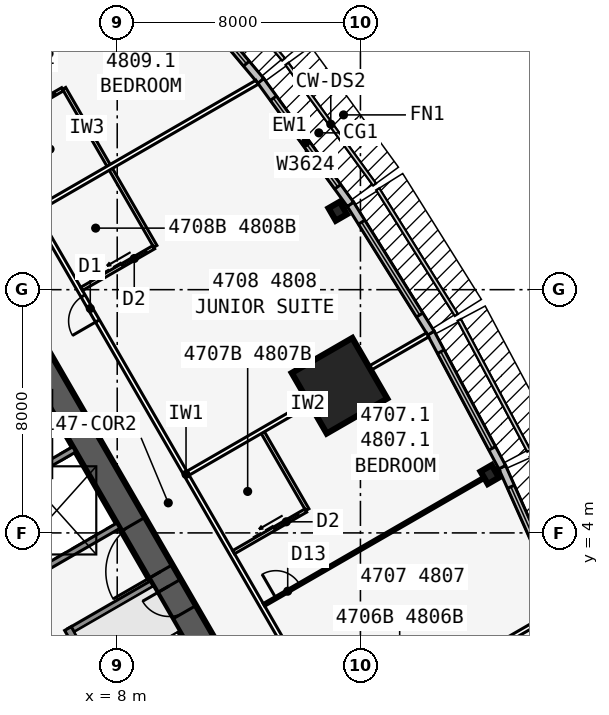
"""IFC4 building model, lengths in metres.
Left out: names, types, materials, properties, quantities, classifications, styles, units other than length and angle.
Written with IfcOpenShell. Run it as: python <this file> out.ifc"""

import sys

from ifc_helpers import new_model, si_unit, direction, frame, frame_2d, origin, origin_2d, place, context, subcontext, project, spatial, rectangle, i_section, extrude, element, fill, save


model = new_model("IFC4")
c1 = context("Model", 3, precision=1e-05, world=origin(), true_north=direction((0.0, 1.0)))
c2 = subcontext(c1, "Body", "Model", "MODEL_VIEW")
j1 = project(units=[si_unit("LENGTHUNIT", "METRE"), si_unit("PLANEANGLEUNIT", "RADIAN")], contexts=[c1])
p1 = place(None, origin())
s1 = spatial("IfcSite", under=j1, at=p1, CompositionType="ELEMENT")
p2 = place(p1, origin())
s2 = spatial("IfcBuilding", under=s1, at=p2, CompositionType="ELEMENT")
p3 = place(p2, frame((0.0, 0.0, 175.9)))
s3 = spatial("IfcBuildingStorey", under=s2, at=p3, CompositionType="ELEMENT", Elevation=175.9)
p4 = place(p3, frame((16.5, -9.526, 0.0), z_axis=(0.0, 0.0, 1.0), x_axis=(-0.499999749417, 0.866025548458, 0.0)))
e1 = element("IfcWall", 1, at=p4, inside=s3, PredefinedType="SHEAR", context=c2, shape_type="SweptSolid", body=[
    extrude(rectangle(XDim=33.0, YDim=0.9, at=frame_2d((16.5, 0.0))), origin(), (0.0, 0.0, 1.0), 3.4),
])
p5 = place(p4, frame((14.15, 0.0, 0.0)))
e2 = element("IfcOpeningElement", 2, at=p5, cuts=e1, PredefinedType="OPENING", context=c2, shape_type="SweptSolid", body=[
    extrude(rectangle(XDim=1.8, YDim=2.13, at=frame_2d((0.9, 1.065))), frame((0.0, 0.46, 0.0), z_axis=(0.0, -1.0, 0.0), x_axis=(1.0, 0.0, 0.0)), (0.0, 0.0, 1.0), 0.92),
])
p6 = place(p4, frame((12.6, 0.0, 0.0)))
e3 = element("IfcOpeningElement", 3, at=p6, cuts=e1, PredefinedType="OPENING", context=c2, shape_type="SweptSolid", body=[
    extrude(rectangle(XDim=1.0, YDim=2.13, at=frame_2d((0.5, 1.065))), frame((0.0, 0.46, 0.0), z_axis=(0.0, -1.0, 0.0), x_axis=(1.0, 0.0, 0.0)), (0.0, 0.0, 1.0), 0.92),
])
p7 = place(p3, frame((10.245, -5.843, 0.0), z_axis=(0.0, 0.0, 1.0), x_axis=(-0.499993009313, 0.866029439822, 0.0)))
e4 = element("IfcWall", 4, at=p7, inside=s3, PredefinedType="SOLIDWALL", context=c2, shape_type="SweptSolid", body=[
    extrude(rectangle(XDim=7.733, YDim=0.25, at=frame_2d((3.866, 0.0))), origin(), (0.0, 0.0, 1.0), 3.235),
])
for number, where, z_axis, x_axis in (
    (5, (6.429, 0.767, 0.0), (0.0, 0.0, 1.0), (0.866, 0.5, 0.0)),
    (6, (5.329, 2.673, 0.0), (0.0, 0.0, 1.0), (0.866, 0.5, 0.0)),
    (7, (3.879, 5.184, 0.0), (0.0, 0.0, 1.0), (0.866, 0.5, 0.0)),
):
    element("IfcWall", number, at=place(p3, frame(where, z_axis=z_axis, x_axis=x_axis)), inside=s3, PredefinedType="SOLIDWALL", context=c2, shape_type="SweptSolid", body=[
        extrude(rectangle(XDim=3.125, YDim=0.2, at=frame_2d((1.562, 0.0))), origin(), (0.0, 0.0, 1.0), 3.235),
    ])
for number, where, z_axis, x_axis in (
    (8, (20.254, 5.92, 0.0), (0.0, 0.0, 1.0), (0.866, 0.5, 0.0)),
    (9, (15.254, 14.58, 0.0), (0.0, 0.0, 1.0), (0.866, 0.5, 0.0)),
):
    element("IfcColumn", number, at=place(p3, frame(where, z_axis=z_axis, x_axis=x_axis)), inside=s3, PredefinedType="COLUMN", context=c2, shape_type="SweptSolid", body=[
        extrude(i_section(OverallWidth=0.424, OverallDepth=0.475, WebThickness=0.048, FlangeThickness=0.077, at=origin_2d()), origin(), (0.0, 0.0, 1.0), 3.4),
    ])
p8 = place(p3, frame((15.312, 8.84, 0.0), z_axis=(0.0, 0.0, 1.0), x_axis=(0.866025403784, 0.5, 0.0)))
e10 = element("IfcColumn", 10, at=p8, inside=s3, PredefinedType="COLUMN", context=c2, shape_type="SweptSolid", body=[
    extrude(rectangle(XDim=2.3, YDim=2.3, at=origin_2d()), origin(), (0.0, 0.0, 1.0), 3.4),
])
p9 = place(p3, frame((22.705, 1.576, 0.0), z_axis=(0.0, 0.0, 1.0), x_axis=(-0.406832200364, 0.913502906808, 0.0)))
e11 = element("IfcWall", 11, at=p9, inside=s3, PredefinedType="STANDARD", context=c2, shape_type="SweptSolid", body=[
    extrude(rectangle(XDim=5.028, YDim=0.25, at=frame_2d((2.514, 0.0))), origin(), (0.0, 0.0, 1.0), 3.235),
])
p10 = place(p9, frame((0.714, 0.0, 0.45)))
e12 = element("IfcOpeningElement", 12, at=p10, cuts=e11, PredefinedType="OPENING", context=c2, shape_type="SweptSolid", body=[
    extrude(rectangle(XDim=3.6, YDim=2.4, at=frame_2d((1.8, 1.2))), frame((0.0, 0.135, 0.0), z_axis=(0.0, -1.0, 0.0), x_axis=(1.0, 0.0, 0.0)), (0.0, 0.0, 1.0), 0.27),
])
p11 = place(p3, frame((20.663, 6.161, 0.0), z_axis=(0.0, 0.0, 1.0), x_axis=(-0.469404966864, 0.882982999317, 0.0)))
e13 = element("IfcWall", 13, at=p11, inside=s3, PredefinedType="STANDARD", context=c2, shape_type="SweptSolid", body=[
    extrude(rectangle(XDim=5.003, YDim=0.25, at=frame_2d((2.501, 0.0))), origin(), (0.0, 0.0, 1.0), 3.235),
])
p12 = place(p11, frame((0.701, 0.0, 0.45)))
e14 = element("IfcOpeningElement", 14, at=p12, cuts=e13, PredefinedType="OPENING", context=c2, shape_type="SweptSolid", body=[
    extrude(rectangle(XDim=3.6, YDim=2.4, at=frame_2d((1.8, 1.2))), frame((0.0, 0.135, 0.0), z_axis=(0.0, -1.0, 0.0), x_axis=(1.0, 0.0, 0.0)), (0.0, 0.0, 1.0), 0.27),
])
p13 = place(p3, frame((18.319, 10.571, 0.0), z_axis=(0.0, 0.0, 1.0), x_axis=(-0.529990167382, 0.84800378683, 0.0)))
e15 = element("IfcWall", 15, at=p13, inside=s3, PredefinedType="STANDARD", context=c2, shape_type="SweptSolid", body=[
    extrude(rectangle(XDim=5.003, YDim=0.25, at=frame_2d((2.501, 0.0))), origin(), (0.0, 0.0, 1.0), 3.235),
])
p14 = place(p13, frame((0.701, 0.0, 0.45)))
e16 = element("IfcOpeningElement", 16, at=p14, cuts=e15, PredefinedType="OPENING", context=c2, shape_type="SweptSolid", body=[
    extrude(rectangle(XDim=3.6, YDim=2.4, at=frame_2d((1.8, 1.2))), frame((0.0, 0.135, 0.0), z_axis=(0.0, -1.0, 0.0), x_axis=(1.0, 0.0, 0.0)), (0.0, 0.0, 1.0), 0.27),
])
p15 = place(p3, frame((15.672, 14.807, 0.0), z_axis=(0.0, 0.0, 1.0), x_axis=(-0.587669188412, 0.809101307001, 0.0)))
e17 = element("IfcWall", 17, at=p15, inside=s3, PredefinedType="STANDARD", context=c2, shape_type="SweptSolid", body=[
    extrude(rectangle(XDim=5.028, YDim=0.25, at=frame_2d((2.514, 0.0))), origin(), (0.0, 0.0, 1.0), 3.235),
])
p16 = place(p15, frame((0.714, 0.0, 0.45)))
e18 = element("IfcOpeningElement", 18, at=p16, cuts=e17, PredefinedType="OPENING", context=c2, shape_type="SweptSolid", body=[
    extrude(rectangle(XDim=3.6, YDim=2.4, at=frame_2d((1.8, 1.2))), frame((0.0, 0.135, 0.0), z_axis=(0.0, -1.0, 0.0), x_axis=(1.0, 0.0, 0.0)), (0.0, 0.0, 1.0), 0.27),
])
p17 = place(p3, frame((12.723, 18.868, 0.0), z_axis=(0.0, 0.0, 1.0), x_axis=(-0.641810386606, 0.766863369607, 0.0)))
e19 = element("IfcWall", 19, at=p17, inside=s3, PredefinedType="STANDARD", context=c2, shape_type="SweptSolid", body=[
    extrude(rectangle(XDim=5.076, YDim=0.25, at=frame_2d((2.538, 0.0))), origin(), (0.0, 0.0, 1.0), 3.235),
])
p18 = place(p17, frame((0.738, 0.0, 0.45)))
e20 = element("IfcOpeningElement", 20, at=p18, cuts=e19, PredefinedType="OPENING", context=c2, shape_type="SweptSolid", body=[
    extrude(rectangle(XDim=3.6, YDim=2.4, at=frame_2d((1.8, 1.2))), frame((0.0, 0.135, 0.0), z_axis=(0.0, -1.0, 0.0), x_axis=(1.0, 0.0, 0.0)), (0.0, 0.0, 1.0), 0.27),
])
p19 = place(p3, frame((20.027, -10.985, 0.0), z_axis=(0.0, 0.0, 1.0), x_axis=(-0.500001677587, 0.866024435227, 0.0)))
e21 = element("IfcWall", 21, at=p19, inside=s3, PredefinedType="PARTITIONING", context=c2, shape_type="SweptSolid", body=[
    extrude(rectangle(XDim=39.054, YDim=0.15, at=frame_2d((19.527, 0.0))), origin(), (0.0, 0.0, 1.0), 3.235),
])
p20 = place(p19, frame((1.558, 0.0, 0.0)))
e22 = element("IfcOpeningElement", 22, at=p20, cuts=e21, PredefinedType="OPENING", context=c2, shape_type="SweptSolid", body=[
    extrude(rectangle(XDim=0.95, YDim=2.13, at=frame_2d((0.475, 1.065))), frame((0.0, 0.085, 0.0), z_axis=(0.0, -1.0, 0.0), x_axis=(1.0, 0.0, 0.0)), (0.0, 0.0, 1.0), 0.17),
])
p21 = place(p19, frame((11.552, 0.0, 0.0)))
e23 = element("IfcOpeningElement", 23, at=p21, cuts=e21, PredefinedType="OPENING", context=c2, shape_type="SweptSolid", body=[
    extrude(rectangle(XDim=0.95, YDim=2.13, at=frame_2d((0.475, 1.065))), frame((0.0, 0.085, 0.0), z_axis=(0.0, -1.0, 0.0), x_axis=(1.0, 0.0, 0.0)), (0.0, 0.0, 1.0), 0.17),
])
p22 = place(p19, frame((25.352, 0.0, 0.0)))
e24 = element("IfcOpeningElement", 24, at=p22, cuts=e21, PredefinedType="OPENING", context=c2, shape_type="SweptSolid", body=[
    extrude(rectangle(XDim=0.95, YDim=2.13, at=frame_2d((0.475, 1.065))), frame((0.0, 0.085, 0.0), z_axis=(0.0, -1.0, 0.0), x_axis=(1.0, 0.0, 0.0)), (0.0, 0.0, 1.0), 0.17),
])
p23 = place(p19, frame((36.546, 0.0, 0.0)))
e25 = element("IfcOpeningElement", 25, at=p23, cuts=e21, PredefinedType="OPENING", context=c2, shape_type="SweptSolid", body=[
    extrude(rectangle(XDim=0.95, YDim=2.13, at=frame_2d((0.475, 1.065))), frame((0.0, 0.085, 0.0), z_axis=(0.0, -1.0, 0.0), x_axis=(1.0, 0.0, 0.0)), (0.0, 0.0, 1.0), 0.17),
])
p24 = place(p3, frame((15.329, -2.697, 0.0), z_axis=(0.0, 0.0, 1.0), x_axis=(0.866024316602, 0.50000188305, 0.0)))
e26 = element("IfcWall", 26, at=p24, inside=s3, PredefinedType="PARTITIONING", context=c2, shape_type="SweptSolid", body=[
    extrude(rectangle(XDim=8.395, YDim=0.15, at=frame_2d((4.198, 0.0))), origin(), (0.0, 0.0, 1.0), 2.389),
])
p25 = place(p3, frame((12.829, 1.633, 0.0), z_axis=(0.0, 0.0, 1.0), x_axis=(0.866027015393, 0.499997208602, 0.0)))
e27 = element("IfcWall", 27, at=p25, inside=s3, PredefinedType="PARTITIONING", context=c2, shape_type="SweptSolid", body=[
    extrude(rectangle(XDim=8.922, YDim=0.1, at=frame_2d((4.461, 0.0))), origin(), (0.0, 0.0, 1.0), 2.389),
])
p26 = place(p25, frame((0.45, 0.0, 0.0)))
e28 = element("IfcOpeningElement", 28, at=p26, cuts=e27, PredefinedType="OPENING", context=c2, shape_type="SweptSolid", body=[
    extrude(rectangle(XDim=0.9, YDim=2.13, at=frame_2d((0.45, 1.065))), frame((0.0, 0.06, 0.0), z_axis=(0.0, -1.0, 0.0), x_axis=(1.0, 0.0, 0.0)), (0.0, 0.0, 1.0), 0.12),
])
p27 = place(p3, frame((10.329, 5.963, 0.0), z_axis=(0.0, 0.0, 1.0), x_axis=(0.866025170687, 0.500000403736, 0.0)))
e29 = element("IfcWall", 29, at=p27, inside=s3, PredefinedType="PARTITIONING", context=c2, shape_type="SweptSolid", body=[
    extrude(rectangle(XDim=9.099, YDim=0.15, at=frame_2d((4.549, 0.0))), origin(), (0.0, 0.0, 1.0), 2.389),
])
p28 = place(p3, frame((5.329, 14.623, 0.0), z_axis=(0.0, 0.0, 1.0), x_axis=(0.866011723728, 0.500023693804, 0.0)))
e30 = element("IfcWall", 30, at=p28, inside=s3, PredefinedType="PARTITIONING", context=c2, shape_type="SweptSolid", body=[
    extrude(rectangle(XDim=8.395, YDim=0.15, at=frame_2d((4.198, 0.0))), origin(), (0.0, 0.0, 1.0), 2.389),
])
p29 = place(p3, frame((2.829, 18.954, 0.0), z_axis=(0.0, 0.0, 1.0), x_axis=(0.866015739374, 0.500016738876, 0.0)))
e31 = element("IfcWall", 31, at=p29, inside=s3, PredefinedType="PARTITIONING", context=c2, shape_type="SweptSolid", body=[
    extrude(rectangle(XDim=7.516, YDim=0.1, at=frame_2d((3.758, 0.0))), origin(), (0.0, 0.0, 1.0), 2.389),
])
p30 = place(p29, frame((0.45, 0.0, 0.0)))
e32 = element("IfcOpeningElement", 32, at=p30, cuts=e31, PredefinedType="OPENING", context=c2, shape_type="SweptSolid", body=[
    extrude(rectangle(XDim=0.9, YDim=2.13, at=frame_2d((0.45, 1.065))), frame((0.0, 0.06, 0.0), z_axis=(0.0, -1.0, 0.0), x_axis=(1.0, 0.0, 0.0)), (0.0, 0.0, 1.0), 0.12),
])
p31 = place(p3, frame((14.253, 4.765, 0.0), z_axis=(0.0, 0.0, 1.0), x_axis=(-0.50002537861, 0.866010750942, 0.0)))
e33 = element("IfcWall", 33, at=p31, inside=s3, PredefinedType="PLUMBINGWALL", context=c2, shape_type="SweptSolid", body=[
    extrude(rectangle(XDim=3.0, YDim=0.12, at=frame_2d((1.5, 0.0))), origin(), (0.0, 0.0, 1.0), 3.235),
])
p32 = place(p3, frame((11.829, 3.365, 0.0), z_axis=(0.0, 0.0, 1.0), x_axis=(0.865997131366, 0.500048966069, 0.0)))
e34 = element("IfcWall", 34, at=p32, inside=s3, PredefinedType="PLUMBINGWALL", context=c2, shape_type="SweptSolid", body=[
    extrude(rectangle(XDim=2.74, YDim=0.12, at=frame_2d((1.37, 0.0))), origin(), (0.0, 0.0, 1.0), 3.235),
])
p33 = place(p32, frame((1.55, 0.0, 0.0)))
e35 = element("IfcOpeningElement", 35, at=p33, cuts=e34, PredefinedType="OPENING", context=c2, shape_type="SweptSolid", body=[
    extrude(rectangle(XDim=0.9, YDim=2.13, at=frame_2d((0.45, 1.065))), frame((0.0, 0.07, 0.0), z_axis=(0.0, -1.0, 0.0), x_axis=(1.0, 0.0, 0.0)), (0.0, 0.0, 1.0), 0.14),
])
p34 = place(p3, frame((9.253, 13.425, 0.0), z_axis=(0.0, 0.0, 1.0), x_axis=(-0.499990139034, 0.866031096941, 0.0)))
e36 = element("IfcWall", 36, at=p34, inside=s3, PredefinedType="PLUMBINGWALL", context=c2, shape_type="SweptSolid", body=[
    extrude(rectangle(XDim=3.0, YDim=0.12, at=frame_2d((1.5, 0.0))), origin(), (0.0, 0.0, 1.0), 3.235),
])
p35 = place(p3, frame((6.829, 12.025, 0.0), z_axis=(0.0, 0.0, 1.0), x_axis=(0.866035715982, 0.499982138324, 0.0)))
e37 = element("IfcWall", 37, at=p35, inside=s3, PredefinedType="PLUMBINGWALL", context=c2, shape_type="SweptSolid", body=[
    extrude(rectangle(XDim=2.74, YDim=0.12, at=frame_2d((1.37, 0.0))), origin(), (0.0, 0.0, 1.0), 3.235),
])
p36 = place(p35, frame((1.55, 0.0, 0.0)))
e38 = element("IfcOpeningElement", 38, at=p36, cuts=e37, PredefinedType="OPENING", context=c2, shape_type="SweptSolid", body=[
    extrude(rectangle(XDim=0.9, YDim=2.13, at=frame_2d((0.45, 1.065))), frame((0.0, 0.07, 0.0), z_axis=(0.0, -1.0, 0.0), x_axis=(1.0, 0.0, 0.0)), (0.0, 0.0, 1.0), 0.14),
])
p37 = place(p3, frame((7.753, 16.023, 0.0), z_axis=(0.0, 0.0, 1.0), x_axis=(-0.499990139034, 0.866031096941, 0.0)))
e39 = element("IfcWall", 39, at=p37, inside=s3, PredefinedType="PLUMBINGWALL", context=c2, shape_type="SweptSolid", body=[
    extrude(rectangle(XDim=3.0, YDim=0.12, at=frame_2d((1.5, 0.0))), origin(), (0.0, 0.0, 1.0), 3.235),
])
p38 = place(p3, frame((3.829, 17.221, 0.0), z_axis=(0.0, 0.0, 1.0), x_axis=(0.865997131366, 0.500048966069, 0.0)))
e40 = element("IfcWall", 40, at=p38, inside=s3, PredefinedType="PLUMBINGWALL", context=c2, shape_type="SweptSolid", body=[
    extrude(rectangle(XDim=2.74, YDim=0.12, at=frame_2d((1.37, 0.0))), origin(), (0.0, 0.0, 1.0), 3.235),
])
p39 = place(p38, frame((1.55, 0.0, 0.0)))
e41 = element("IfcOpeningElement", 41, at=p39, cuts=e40, PredefinedType="OPENING", context=c2, shape_type="SweptSolid", body=[
    extrude(rectangle(XDim=0.9, YDim=2.13, at=frame_2d((0.45, 1.065))), frame((0.0, 0.07, 0.0), z_axis=(0.0, -1.0, 0.0), x_axis=(1.0, 0.0, 0.0)), (0.0, 0.0, 1.0), 0.14),
])
p40 = place(p10, origin())
e42 = element("IfcWindow", 42, at=p40, inside=s3, PartitioningType="SINGLE_PANEL", PredefinedType="WINDOW", context=c2, shape_type="SweptSolid", body=[
    extrude(rectangle(XDim=3.6, YDim=2.4, at=frame_2d((1.8, 1.2))), frame((0.0, 0.03, 0.0), z_axis=(0.0, -1.0, 0.0), x_axis=(1.0, 0.0, 0.0)), (0.0, 0.0, 1.0), 0.06),
])
fill(e12, e42)
p41 = place(p12, origin())
e43 = element("IfcWindow", 43, at=p41, inside=s3, PartitioningType="SINGLE_PANEL", PredefinedType="WINDOW", context=c2, shape_type="SweptSolid", body=[
    extrude(rectangle(XDim=3.6, YDim=2.4, at=frame_2d((1.8, 1.2))), frame((0.0, 0.03, 0.0), z_axis=(0.0, -1.0, 0.0), x_axis=(1.0, 0.0, 0.0)), (0.0, 0.0, 1.0), 0.06),
])
fill(e14, e43)
p42 = place(p14, origin())
e44 = element("IfcWindow", 44, at=p42, inside=s3, PartitioningType="SINGLE_PANEL", PredefinedType="WINDOW", context=c2, shape_type="SweptSolid", body=[
    extrude(rectangle(XDim=3.6, YDim=2.4, at=frame_2d((1.8, 1.2))), frame((0.0, 0.03, 0.0), z_axis=(0.0, -1.0, 0.0), x_axis=(1.0, 0.0, 0.0)), (0.0, 0.0, 1.0), 0.06),
])
fill(e16, e44)
p43 = place(p16, origin())
e45 = element("IfcWindow", 45, at=p43, inside=s3, PartitioningType="SINGLE_PANEL", PredefinedType="WINDOW", context=c2, shape_type="SweptSolid", body=[
    extrude(rectangle(XDim=3.6, YDim=2.4, at=frame_2d((1.8, 1.2))), frame((0.0, 0.03, 0.0), z_axis=(0.0, -1.0, 0.0), x_axis=(1.0, 0.0, 0.0)), (0.0, 0.0, 1.0), 0.06),
])
fill(e18, e45)
p44 = place(p18, origin())
e46 = element("IfcWindow", 46, at=p44, inside=s3, PartitioningType="SINGLE_PANEL", PredefinedType="WINDOW", context=c2, shape_type="SweptSolid", body=[
    extrude(rectangle(XDim=3.6, YDim=2.4, at=frame_2d((1.8, 1.2))), frame((0.0, 0.03, 0.0), z_axis=(0.0, -1.0, 0.0), x_axis=(1.0, 0.0, 0.0)), (0.0, 0.0, 1.0), 0.06),
])
fill(e20, e46)
p45 = place(p26, origin())
e47 = element("IfcDoor", 47, at=p45, inside=s3, OperationType="SINGLE_SWING_LEFT", PredefinedType="DOOR", context=c2, shape_type="SweptSolid", body=[
    extrude(rectangle(XDim=0.9, YDim=2.13, at=frame_2d((0.45, 1.065))), frame((0.0, 0.025, 0.0), z_axis=(0.0, -1.0, 0.0), x_axis=(1.0, 0.0, 0.0)), (0.0, 0.0, 1.0), 0.05),
])
fill(e28, e47)
p46 = place(p33, origin())
e48 = element("IfcDoor", 48, at=p46, inside=s3, OperationType="SLIDING_TO_LEFT", PredefinedType="DOOR", context=c2, shape_type="SweptSolid", body=[
    extrude(rectangle(XDim=0.9, YDim=2.13, at=frame_2d((0.45, 1.065))), frame((0.0, 0.025, 0.0), z_axis=(0.0, -1.0, 0.0), x_axis=(1.0, 0.0, 0.0)), (0.0, 0.0, 1.0), 0.05),
])
fill(e35, e48)
p47 = place(p36, origin())
e49 = element("IfcDoor", 49, at=p47, inside=s3, OperationType="SLIDING_TO_LEFT", PredefinedType="DOOR", context=c2, shape_type="SweptSolid", body=[
    extrude(rectangle(XDim=0.9, YDim=2.13, at=frame_2d((0.45, 1.065))), frame((0.0, 0.025, 0.0), z_axis=(0.0, -1.0, 0.0), x_axis=(1.0, 0.0, 0.0)), (0.0, 0.0, 1.0), 0.05),
])
fill(e38, e49)
p48 = place(p22, origin())
e50 = element("IfcDoor", 50, at=p48, inside=s3, OperationType="SINGLE_SWING_LEFT", PredefinedType="DOOR", context=c2, shape_type="SweptSolid", body=[
    extrude(rectangle(XDim=0.95, YDim=2.13, at=frame_2d((0.475, 1.065))), frame((0.0, 0.025, 0.0), z_axis=(0.0, -1.0, 0.0), x_axis=(1.0, 0.0, 0.0)), (0.0, 0.0, 1.0), 0.05),
])
fill(e24, e50)
p49 = place(p39, origin())
e51 = element("IfcDoor", 51, at=p49, inside=s3, OperationType="SLIDING_TO_LEFT", PredefinedType="DOOR", context=c2, shape_type="SweptSolid", body=[
    extrude(rectangle(XDim=0.9, YDim=2.13, at=frame_2d((0.45, 1.065))), frame((0.0, 0.025, 0.0), z_axis=(0.0, -1.0, 0.0), x_axis=(1.0, 0.0, 0.0)), (0.0, 0.0, 1.0), 0.05),
])
fill(e41, e51)
p50 = place(p5, origin())
e52 = element("IfcDoor", 52, at=p50, inside=s3, OperationType="DOUBLE_DOOR_SINGLE_SWING", PredefinedType="DOOR", context=c2, shape_type="SweptSolid", body=[
    extrude(rectangle(XDim=1.8, YDim=2.13, at=frame_2d((0.9, 1.065))), frame((0.0, 0.025, 0.0), z_axis=(0.0, -1.0, 0.0), x_axis=(1.0, 0.0, 0.0)), (0.0, 0.0, 1.0), 0.05),
])
fill(e2, e52)
p51 = place(p6, origin())
e53 = element("IfcDoor", 53, at=p51, inside=s3, OperationType="SINGLE_SWING_RIGHT", PredefinedType="DOOR", context=c2, shape_type="SweptSolid", body=[
    extrude(rectangle(XDim=1.0, YDim=2.13, at=frame_2d((0.5, 1.065))), frame((0.0, 0.025, 0.0), z_axis=(0.0, -1.0, 0.0), x_axis=(1.0, 0.0, 0.0)), (0.0, 0.0, 1.0), 0.05),
])
fill(e3, e53)
save(model, sys.argv[1])
